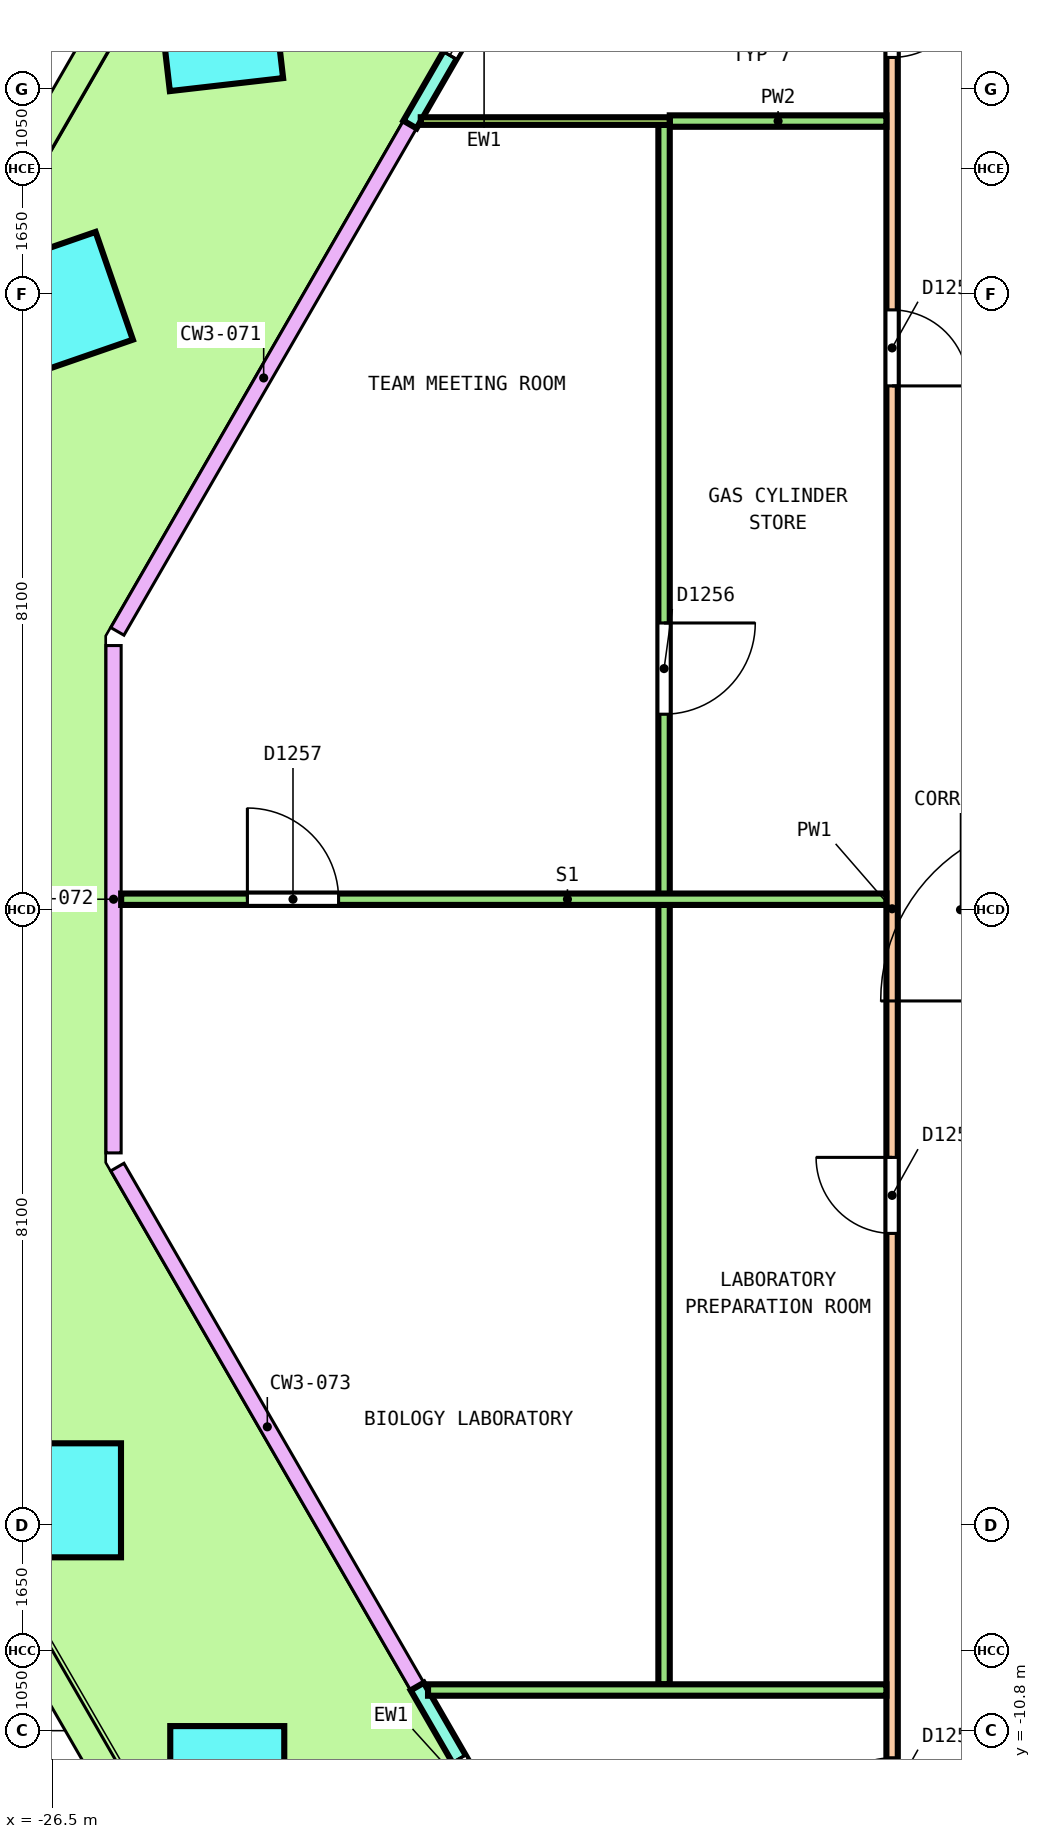
"""IFC4 building model, lengths in metres.
Left out: names, types, materials, properties, quantities, classifications, styles, units other than length and angle.
Written with IfcOpenShell. Run it as: python <this file> out.ifc"""

import sys

from ifc_helpers import new_model, si_unit, direction, frame, frame_2d, origin, origin_2d, place, context, subcontext, project, spatial, rectangle, extrude, element, fill, save


model = new_model("IFC4")
c1 = context("Model", 3, precision=1e-05, world=origin(), true_north=direction((0.0, 1.0)))
c2 = subcontext(c1, "Body", "Model", "MODEL_VIEW")
j1 = project(units=[si_unit("LENGTHUNIT", "METRE"), si_unit("PLANEANGLEUNIT", "RADIAN")], contexts=[c1])
p1 = place(None, origin())
s1 = spatial("IfcSite", under=j1, at=p1, CompositionType="ELEMENT")
p2 = place(p1, origin())
s2 = spatial("IfcBuilding", under=s1, at=p2, CompositionType="ELEMENT")
p3 = place(p2, frame((0.0, 0.0, 19.0)))
s3 = spatial("IfcBuildingStorey", under=s2, at=p3, CompositionType="ELEMENT", Elevation=19.0)
p4 = place(p3, frame((-24.292, 11.601, 0.0), z_axis=(-0.025425823116, 0.018798238892, 0.999499951843), x_axis=(-0.498882626684, -0.866662044711, 0.003609023418)))
e1 = element("IfcColumn", 1, at=p4, inside=s3, PredefinedType="COLUMN", context=c2, shape_type="SweptSolid", body=[
    extrude(rectangle(XDim=1.5, YDim=1.5, at=origin_2d()), origin(), (0.0, 0.0, 1.0), 4.052),
])
p5 = place(p3, frame((-26.393, 7.963, 0.0), z_axis=(-0.021749390218, 0.025123256844, 0.9994477405), x_axis=(-0.500502362591, -0.865666942435, 0.01086875412)))
e2 = element("IfcColumn", 2, at=p5, inside=s3, PredefinedType="COLUMN", context=c2, shape_type="SweptSolid", body=[
    extrude(rectangle(XDim=1.5, YDim=1.5, at=origin_2d()), origin(), (0.0, 0.0, 1.0), 4.052),
])
p6 = place(p3, frame((-26.345, -7.77, 0.0), z_axis=(-0.010908253887, 0.018863444567, 0.99976256204), x_axis=(0.500638377412, -0.865382225109, 0.021790354016)))
e3 = element("IfcColumn", 3, at=p6, inside=s3, PredefinedType="COLUMN", context=c2, shape_type="SweptSolid", body=[
    extrude(rectangle(XDim=1.5, YDim=1.5, at=origin_2d()), origin(), (0.0, 0.0, 1.0), 4.051),
])
p7 = place(p3, frame((-24.197, -11.49, 0.0), z_axis=(-0.003616758439, 0.006329327268, 0.999973428984), x_axis=(0.495951477881, -0.868319636001, 0.00728980954)))
e4 = element("IfcColumn", 4, at=p7, inside=s3, PredefinedType="COLUMN", context=c2, shape_type="SweptSolid", body=[
    extrude(rectangle(XDim=1.5, YDim=1.5, at=origin_2d()), origin(), (0.0, 0.0, 1.0), 4.05),
])
p8 = place(p3, frame((-19.843, 13.708, 0.0), z_axis=(0.0, 0.0, 1.0), x_axis=(-0.499997012787, -0.866027128446, 0.0)))
e5 = element("IfcWall", 5, at=p8, inside=s3, PredefinedType="SOLIDWALL", context=c2, shape_type="SweptSolid", body=[
    extrude(rectangle(XDim=3.9, YDim=0.2, at=frame_2d((1.95, 0.0))), origin(), (0.0, 0.0, 1.0), 4.1),
])
p9 = place(p8, frame((1.05, 0.0, 0.0)))
e6 = element("IfcOpeningElement", 6, at=p9, cuts=e5, PredefinedType="OPENING", context=c2, shape_type="SweptSolid", body=[
    extrude(rectangle(XDim=1.8, YDim=2.4, at=frame_2d((0.9, 1.2))), frame((0.0, 0.11, 0.0), z_axis=(0.0, -1.0, 0.0), x_axis=(1.0, 0.0, 0.0)), (0.0, 0.0, 1.0), 0.22),
])
p10 = place(p8, frame((1.05, 0.0, 2.55)))
e7 = element("IfcOpeningElement", 7, at=p10, cuts=e5, PredefinedType="OPENING", context=c2, shape_type="SweptSolid", body=[
    extrude(rectangle(XDim=1.8, YDim=0.45, at=frame_2d((0.9, 0.225))), frame((0.0, 0.11, 0.0), z_axis=(0.0, -1.0, 0.0), x_axis=(1.0, 0.0, 0.0)), (0.0, 0.0, 1.0), 0.22),
])
p11 = place(p3, frame((-21.697, -10.22, 0.0), z_axis=(0.0, 0.0, 1.0), x_axis=(0.499983378401, -0.866035000056, 0.0)))
e8 = element("IfcWall", 8, at=p11, inside=s3, PredefinedType="SOLIDWALL", context=c2, shape_type="SweptSolid", body=[
    extrude(rectangle(XDim=3.996, YDim=0.2, at=frame_2d((1.998, 0.0))), origin(), (0.0, 0.0, 1.0), 4.1),
])
p12 = place(p11, frame((1.098, 0.0, 0.0)))
e9 = element("IfcOpeningElement", 9, at=p12, cuts=e8, PredefinedType="OPENING", context=c2, shape_type="SweptSolid", body=[
    extrude(rectangle(XDim=1.8, YDim=2.4, at=frame_2d((0.9, 1.2))), frame((0.0, 0.11, 0.0), z_axis=(0.0, -1.0, 0.0), x_axis=(1.0, 0.0, 0.0)), (0.0, 0.0, 1.0), 0.22),
])
p13 = place(p11, frame((1.098, 0.0, 2.55)))
e10 = element("IfcOpeningElement", 10, at=p13, cuts=e8, PredefinedType="OPENING", context=c2, shape_type="SweptSolid", body=[
    extrude(rectangle(XDim=1.8, YDim=0.45, at=frame_2d((0.9, 0.225))), frame((0.0, 0.11, 0.0), z_axis=(0.0, -1.0, 0.0), x_axis=(1.0, 0.0, 0.0)), (0.0, 0.0, 1.0), 0.22),
])
p14 = place(p3, frame((-15.45, -12.975, 0.0), z_axis=(0.0, 0.0, 1.0), x_axis=(0.0, 1.0, 0.0)))
e11 = element("IfcWall", 11, at=p14, inside=s3, PredefinedType="PARTITIONING", context=c2, shape_type="SweptSolid", body=[
    extrude(rectangle(XDim=25.975, YDim=0.15, at=frame_2d((12.988, 0.0))), origin(), (0.0, 0.0, 1.0), 3.05),
])
p15 = place(p14, frame((24.188, 0.0, 0.0)))
e12 = element("IfcOpeningElement", 12, at=p15, cuts=e11, PredefinedType="OPENING", context=c2, shape_type="SweptSolid", body=[
    extrude(rectangle(XDim=1.0, YDim=2.1, at=frame_2d((0.5, 1.05))), frame((0.0, 0.085, 0.0), z_axis=(0.0, -1.0, 0.0), x_axis=(1.0, 0.0, 0.0)), (0.0, 0.0, 1.0), 0.17),
])
p16 = place(p14, frame((19.866, 0.0, 0.0)))
e13 = element("IfcOpeningElement", 13, at=p16, cuts=e11, PredefinedType="OPENING", context=c2, shape_type="SweptSolid", body=[
    extrude(rectangle(XDim=1.0, YDim=2.1, at=frame_2d((0.5, 1.05))), frame((0.0, 0.085, 0.0), z_axis=(0.0, -1.0, 0.0), x_axis=(1.0, 0.0, 0.0)), (0.0, 0.0, 1.0), 0.17),
])
p17 = place(p14, frame((8.717, 0.0, 0.0)))
e14 = element("IfcOpeningElement", 14, at=p17, cuts=e11, PredefinedType="OPENING", context=c2, shape_type="SweptSolid", body=[
    extrude(rectangle(XDim=1.0, YDim=2.1, at=frame_2d((0.5, 1.05))), frame((0.0, 0.085, 0.0), z_axis=(0.0, -1.0, 0.0), x_axis=(1.0, 0.0, 0.0)), (0.0, 0.0, 1.0), 0.17),
])
p18 = place(p14, frame((0.817, 0.0, 0.0)))
e15 = element("IfcOpeningElement", 15, at=p18, cuts=e11, PredefinedType="OPENING", context=c2, shape_type="SweptSolid", body=[
    extrude(rectangle(XDim=1.0, YDim=2.1, at=frame_2d((0.5, 1.05))), frame((0.0, 0.085, 0.0), z_axis=(0.0, -1.0, 0.0), x_axis=(1.0, 0.0, 0.0)), (0.0, 0.0, 1.0), 0.17),
])
p19 = place(p3, frame((-18.375, 10.376, 0.0), z_axis=(0.0, 0.0, 1.0), x_axis=(1.0, 0.0, 0.0)))
e16 = element("IfcWall", 16, at=p19, inside=s3, PredefinedType="PARTITIONING", context=c2, shape_type="SweptSolid", body=[
    extrude(rectangle(XDim=2.85, YDim=0.15, at=frame_2d((1.425, 0.0))), origin(), (0.0, 0.0, 1.0), 3.05),
])
p20 = place(p3, frame((-18.45, -10.19, 0.0), z_axis=(0.0, 0.0, 1.0), x_axis=(0.0, 1.0, 0.0)))
e17 = element("IfcWall", 17, at=p20, inside=s3, PredefinedType="PARTITIONING", context=c2, shape_type="SweptSolid", body=[
    extrude(rectangle(XDim=20.516, YDim=0.15, at=frame_2d((10.258, 0.0))), origin(), (0.0, 0.0, 1.0), 3.05),
])
p21 = place(p20, frame((12.763, 0.0, 0.0)))
e18 = element("IfcOpeningElement", 18, at=p21, cuts=e17, PredefinedType="OPENING", context=c2, shape_type="SweptSolid", body=[
    extrude(rectangle(XDim=1.2, YDim=2.1, at=frame_2d((0.6, 1.05))), frame((0.0, 0.085, 0.0), z_axis=(0.0, -1.0, 0.0), x_axis=(1.0, 0.0, 0.0)), (0.0, 0.0, 1.0), 0.17),
])
p22 = place(p3, frame((-25.593, 0.138, 0.0), z_axis=(0.0, 0.0, 1.0), x_axis=(1.0, 0.0, 0.0)))
e19 = element("IfcWall", 19, at=p22, inside=s3, PredefinedType="PARTITIONING", context=c2, shape_type="SweptSolid", body=[
    extrude(rectangle(XDim=10.068, YDim=0.15, at=frame_2d((5.034, 0.0))), origin(), (0.0, 0.0, 1.0), 3.05),
])
p23 = place(p22, frame((1.661, 0.0, 0.0)))
e20 = element("IfcOpeningElement", 20, at=p23, cuts=e19, PredefinedType="OPENING", context=c2, shape_type="SweptSolid", body=[
    extrude(rectangle(XDim=1.2, YDim=2.1, at=frame_2d((0.6, 1.05))), frame((0.0, 0.085, 0.0), z_axis=(0.0, -1.0, 0.0), x_axis=(1.0, 0.0, 0.0)), (0.0, 0.0, 1.0), 0.17),
])
p24 = place(p3, frame((-21.555, -10.265, 0.0), z_axis=(0.0, 0.0, 1.0), x_axis=(1.0, 0.0, 0.0)))
e21 = element("IfcWall", 21, at=p24, inside=s3, PredefinedType="PARTITIONING", context=c2, shape_type="SweptSolid", body=[
    extrude(rectangle(XDim=6.031, YDim=0.15, at=frame_2d((3.015, 0.0))), origin(), (0.0, 0.0, 1.0), 3.05),
])
p25 = place(p3, frame((-21.651, 10.376, 0.0), z_axis=(0.0, 0.0, 1.0), x_axis=(1.0, 0.0, 0.0)))
e22 = element("IfcWall", 22, at=p25, inside=s3, PredefinedType="PARTITIONING", context=c2, shape_type="SweptSolid", body=[
    extrude(rectangle(XDim=3.276, YDim=0.1, at=frame_2d((1.638, 0.0))), origin(), (0.0, 0.0, 1.0), 3.05),
])
p26 = place(p9, origin())
e23 = element("IfcDoor", 23, at=p26, inside=s3, OperationType="DOUBLE_DOOR_SINGLE_SWING", PredefinedType="DOOR", context=c2, shape_type="SweptSolid", body=[
    extrude(rectangle(XDim=1.8, YDim=2.4, at=frame_2d((0.9, 1.2))), frame((0.0, 0.025, 0.0), z_axis=(0.0, -1.0, 0.0), x_axis=(1.0, 0.0, 0.0)), (0.0, 0.0, 1.0), 0.05),
])
fill(e6, e23)
p27 = place(p10, origin())
e24 = element("IfcWindow", 24, at=p27, inside=s3, PartitioningType="SINGLE_PANEL", PredefinedType="WINDOW", context=c2, shape_type="SweptSolid", body=[
    extrude(rectangle(XDim=1.8, YDim=0.45, at=frame_2d((0.9, 0.225))), frame((0.0, 0.03, 0.0), z_axis=(0.0, -1.0, 0.0), x_axis=(1.0, 0.0, 0.0)), (0.0, 0.0, 1.0), 0.06),
])
fill(e7, e24)
p28 = place(p12, origin())
e25 = element("IfcDoor", 25, at=p28, inside=s3, OperationType="DOUBLE_DOOR_SINGLE_SWING", PredefinedType="DOOR", context=c2, shape_type="SweptSolid", body=[
    extrude(rectangle(XDim=1.8, YDim=2.4, at=frame_2d((0.9, 1.2))), frame((0.0, 0.025, 0.0), z_axis=(0.0, -1.0, 0.0), x_axis=(1.0, 0.0, 0.0)), (0.0, 0.0, 1.0), 0.05),
])
fill(e9, e25)
p29 = place(p13, origin())
e26 = element("IfcWindow", 26, at=p29, inside=s3, PartitioningType="SINGLE_PANEL", PredefinedType="WINDOW", context=c2, shape_type="SweptSolid", body=[
    extrude(rectangle(XDim=1.8, YDim=0.45, at=frame_2d((0.9, 0.225))), frame((0.0, 0.03, 0.0), z_axis=(0.0, -1.0, 0.0), x_axis=(1.0, 0.0, 0.0)), (0.0, 0.0, 1.0), 0.06),
])
fill(e10, e26)
p30 = place(p15, origin())
e27 = element("IfcDoor", 27, at=p30, inside=s3, OperationType="SINGLE_SWING_LEFT", PredefinedType="DOOR", context=c2, shape_type="SweptSolid", body=[
    extrude(rectangle(XDim=1.0, YDim=2.1, at=frame_2d((0.5, 1.05))), frame((0.0, 0.025, 0.0), z_axis=(0.0, -1.0, 0.0), x_axis=(1.0, 0.0, 0.0)), (0.0, 0.0, 1.0), 0.05),
])
fill(e12, e27)
p31 = place(p16, origin())
e28 = element("IfcDoor", 28, at=p31, inside=s3, OperationType="SINGLE_SWING_LEFT", PredefinedType="DOOR", context=c2, shape_type="SweptSolid", body=[
    extrude(rectangle(XDim=1.0, YDim=2.1, at=frame_2d((0.5, 1.05))), frame((0.0, 0.025, 0.0), z_axis=(0.0, -1.0, 0.0), x_axis=(1.0, 0.0, 0.0)), (0.0, 0.0, 1.0), 0.05),
])
fill(e13, e28)
p32 = place(p21, origin())
e29 = element("IfcDoor", 29, at=p32, inside=s3, OperationType="DOUBLE_DOOR_SINGLE_SWING", PredefinedType="DOOR", context=c2, shape_type="SweptSolid", body=[
    extrude(rectangle(XDim=1.2, YDim=2.1, at=frame_2d((0.6, 1.05))), frame((0.0, 0.025, 0.0), z_axis=(0.0, -1.0, 0.0), x_axis=(1.0, 0.0, 0.0)), (0.0, 0.0, 1.0), 0.05),
])
fill(e18, e29)
p33 = place(p23, origin())
e30 = element("IfcDoor", 30, at=p33, inside=s3, OperationType="DOUBLE_DOOR_SINGLE_SWING", PredefinedType="DOOR", context=c2, shape_type="SweptSolid", body=[
    extrude(rectangle(XDim=1.2, YDim=2.1, at=frame_2d((0.6, 1.05))), frame((0.0, 0.025, 0.0), z_axis=(0.0, -1.0, 0.0), x_axis=(1.0, 0.0, 0.0)), (0.0, 0.0, 1.0), 0.05),
])
fill(e20, e30)
p34 = place(p17, origin())
e31 = element("IfcDoor", 31, at=p34, inside=s3, OperationType="SINGLE_SWING_RIGHT", PredefinedType="DOOR", context=c2, shape_type="SweptSolid", body=[
    extrude(rectangle(XDim=1.0, YDim=2.1, at=frame_2d((0.5, 1.05))), frame((0.0, 0.025, 0.0), z_axis=(0.0, -1.0, 0.0), x_axis=(1.0, 0.0, 0.0)), (0.0, 0.0, 1.0), 0.05),
])
fill(e14, e31)
p35 = place(p18, origin())
e32 = element("IfcDoor", 32, at=p35, inside=s3, OperationType="SINGLE_SWING_RIGHT", PredefinedType="DOOR", context=c2, shape_type="SweptSolid", body=[
    extrude(rectangle(XDim=1.0, YDim=2.1, at=frame_2d((0.5, 1.05))), frame((0.0, 0.025, 0.0), z_axis=(0.0, -1.0, 0.0), x_axis=(1.0, 0.0, 0.0)), (0.0, 0.0, 1.0), 0.05),
])
fill(e15, e32)
save(model, sys.argv[1])
